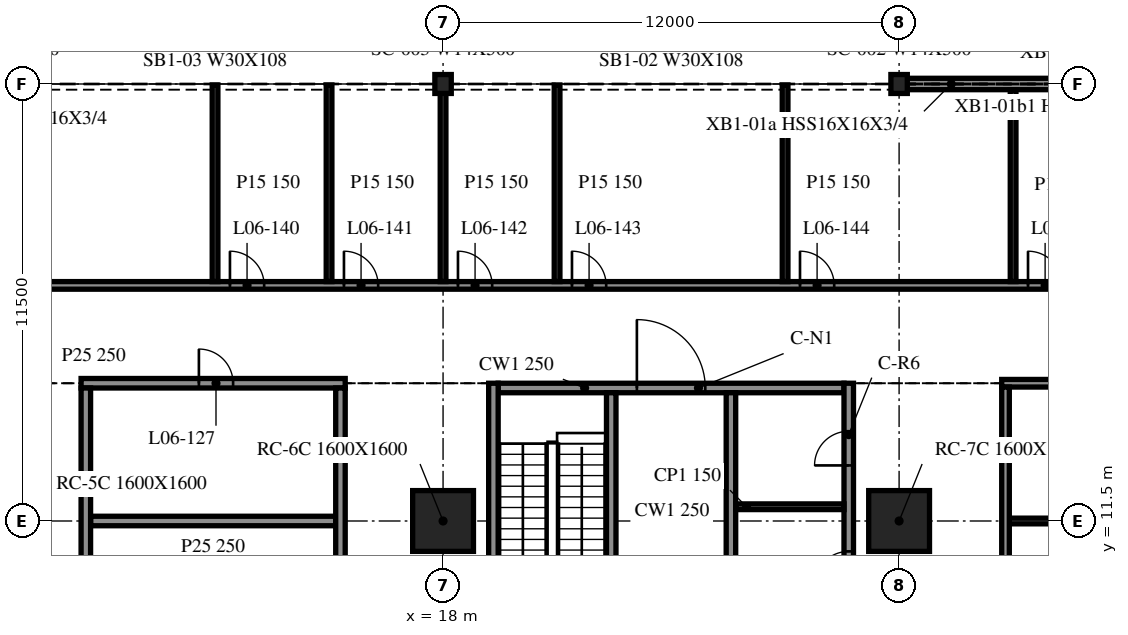
"""IFC4 building model, lengths in metres.
Left out: names, types, materials, properties, quantities, classifications, styles, units other than length and angle.
Written with IfcOpenShell. Run it as: python <this file> out.ifc"""

import sys

from ifc_helpers import new_model, si_unit, direction, frame, frame_2d, origin, origin_2d, place, context, subcontext, project, spatial, rectangle, i_section, extrude, element, fill, save


model = new_model("IFC4")
c1 = context("Model", 3, precision=1e-05, world=origin(), true_north=direction((0.0, 1.0)))
c2 = subcontext(c1, "Body", "Model", "MODEL_VIEW")
j1 = project(units=[si_unit("LENGTHUNIT", "METRE"), si_unit("PLANEANGLEUNIT", "RADIAN")], contexts=[c1])
p1 = place(None, origin())
s1 = spatial("IfcSite", under=j1, at=p1, CompositionType="ELEMENT")
p2 = place(p1, origin())
s2 = spatial("IfcBuilding", under=s1, at=p2, CompositionType="ELEMENT")
p3 = place(p2, frame((0.0, 0.0, 28.7)))
s3 = spatial("IfcBuildingStorey", under=s2, at=p3, CompositionType="ELEMENT", Elevation=28.7)
for number, where, z_axis, x_axis in (
    (1, (18.0, 11.5, -0.34), (0.0, 0.0, 1.0), (1.0, 0.0, 0.0)),
    (2, (30.0, 11.5, -0.34), (0.0, 0.0, 1.0), (1.0, 0.0, 0.0)),
):
    element("IfcColumn", number, at=place(p3, frame(where, z_axis=z_axis, x_axis=x_axis)), inside=s3, PredefinedType="COLUMN", context=c2, shape_type="SweptSolid", body=[
        extrude(rectangle(XDim=1.6, YDim=1.6, at=origin_2d()), origin(), (0.0, 0.0, 1.0), 4.3),
    ])
for number, where, z_axis, x_axis in (
    (3, (30.0, 23.0, -0.34), (0.0, 0.0, 1.0), (1.0, 0.0, 0.0)),
    (4, (18.0, 23.0, -0.34), (0.0, 0.0, 1.0), (1.0, 0.0, 0.0)),
):
    element("IfcColumn", number, at=place(p3, frame(where, z_axis=z_axis, x_axis=x_axis)), inside=s3, PredefinedType="COLUMN", context=c2, shape_type="SweptSolid", body=[
        extrude(i_section(OverallWidth=0.432, OverallDepth=0.498, WebThickness=0.056, FlangeThickness=0.089, at=origin_2d()), origin(), (0.0, 0.0, 1.0), 4.3),
    ])
p4 = place(p3, frame((41.972, 23.0, 0.0), z_axis=(0.0, 0.0, 1.0), x_axis=(-1.0, 0.0, 0.0)))
e5 = element("IfcWall", 5, at=p4, inside=s3, PredefinedType="NOTDEFINED", context=c2, shape_type="SweptSolid", body=[
    extrude(rectangle(XDim=11.944, YDim=0.3, at=frame_2d((5.972, 0.0))), origin(), (0.0, 0.0, 1.0), 3.203),
])
p5 = place(p3, frame((19.325, 15.125, 0.0), z_axis=(0.0, 0.0, 1.0), x_axis=(0.0, -1.0, 0.0)))
e6 = element("IfcWall", 6, at=p5, inside=s3, PredefinedType="SOLIDWALL", context=c2, shape_type="SweptSolid", body=[
    extrude(rectangle(XDim=24.25, YDim=0.25, at=frame_2d((12.125, 0.0))), origin(), (0.0, 0.0, 1.0), 3.96),
])
p6 = place(p3, frame((28.675, -9.125, 0.0), z_axis=(0.0, 0.0, 1.0), x_axis=(0.0, 1.0, 0.0)))
e7 = element("IfcWall", 7, at=p6, inside=s3, PredefinedType="SOLIDWALL", context=c2, shape_type="SweptSolid", body=[
    extrude(rectangle(XDim=24.25, YDim=0.25, at=frame_2d((12.125, 0.0))), origin(), (0.0, 0.0, 1.0), 3.96),
])
p7 = place(p6, frame((14.425, 0.0, 0.0)))
e8 = element("IfcOpeningElement", 8, at=p7, cuts=e7, PredefinedType="OPENING", context=c2, shape_type="SweptSolid", body=[
    extrude(rectangle(XDim=0.9, YDim=2.1, at=frame_2d((0.45, 1.05))), frame((0.0, 0.135, 0.0), z_axis=(0.0, -1.0, 0.0), x_axis=(1.0, 0.0, 0.0)), (0.0, 0.0, 1.0), 0.27),
])
p8 = place(p6, frame((18.925, 0.0, 0.0)))
e9 = element("IfcOpeningElement", 9, at=p8, cuts=e7, PredefinedType="OPENING", context=c2, shape_type="SweptSolid", body=[
    extrude(rectangle(XDim=0.9, YDim=2.1, at=frame_2d((0.45, 1.05))), frame((0.0, 0.135, 0.0), z_axis=(0.0, -1.0, 0.0), x_axis=(1.0, 0.0, 0.0)), (0.0, 0.0, 1.0), 0.27),
])
p9 = place(p6, frame((22.087, 0.0, 0.0)))
e10 = element("IfcOpeningElement", 10, at=p9, cuts=e7, PredefinedType="OPENING", context=c2, shape_type="SweptSolid", body=[
    extrude(rectangle(XDim=0.9, YDim=2.1, at=frame_2d((0.45, 1.05))), frame((0.0, 0.135, 0.0), z_axis=(0.0, -1.0, 0.0), x_axis=(1.0, 0.0, 0.0)), (0.0, 0.0, 1.0), 0.27),
])
p10 = place(p3, frame((19.45, 15.0, 0.0), z_axis=(0.0, 0.0, 1.0), x_axis=(1.0, 0.0, 0.0)))
e11 = element("IfcWall", 11, at=p10, inside=s3, PredefinedType="SOLIDWALL", context=c2, shape_type="SweptSolid", body=[
    extrude(rectangle(XDim=9.1, YDim=0.25, at=frame_2d((4.55, 0.0))), origin(), (0.0, 0.0, 1.0), 3.96),
])
p11 = place(p10, frame((3.65, 0.0, 0.0)))
e12 = element("IfcOpeningElement", 12, at=p11, cuts=e11, PredefinedType="OPENING", context=c2, shape_type="SweptSolid", body=[
    extrude(rectangle(XDim=1.8, YDim=2.1, at=frame_2d((0.9, 1.05))), frame((0.0, 0.135, 0.0), z_axis=(0.0, -1.0, 0.0), x_axis=(1.0, 0.0, 0.0)), (0.0, 0.0, 1.0), 0.27),
])
p12 = place(p3, frame((22.425, 14.875, 0.0), z_axis=(0.0, 0.0, 1.0), x_axis=(0.0, -1.0, 0.0)))
e13 = element("IfcWall", 13, at=p12, inside=s3, PredefinedType="SOLIDWALL", context=c2, shape_type="SweptSolid", body=[
    extrude(rectangle(XDim=6.25, YDim=0.25, at=frame_2d((3.125, 0.0))), origin(), (0.0, 0.0, 1.0), 3.96),
])
p13 = place(p12, frame((4.85, 0.0, 0.0)))
e14 = element("IfcOpeningElement", 14, at=p13, cuts=e13, PredefinedType="OPENING", context=c2, shape_type="SweptSolid", body=[
    extrude(rectangle(XDim=1.0, YDim=2.1, at=frame_2d((0.5, 1.05))), frame((0.0, 0.135, 0.0), z_axis=(0.0, -1.0, 0.0), x_axis=(1.0, 0.0, 0.0)), (0.0, 0.0, 1.0), 0.27),
])
p14 = place(p3, frame((25.575, 14.875, 0.0), z_axis=(0.0, 0.0, 1.0), x_axis=(0.0, -1.0, 0.0)))
e15 = element("IfcWall", 15, at=p14, inside=s3, PredefinedType="SOLIDWALL", context=c2, shape_type="SweptSolid", body=[
    extrude(rectangle(XDim=17.5, YDim=0.25, at=frame_2d((8.75, 0.0))), origin(), (0.0, 0.0, 1.0), 3.96),
])
p15 = place(p14, frame((15.45, 0.0, 0.0)))
e16 = element("IfcOpeningElement", 16, at=p15, cuts=e15, PredefinedType="OPENING", context=c2, shape_type="SweptSolid", body=[
    extrude(rectangle(XDim=1.1, YDim=2.1, at=frame_2d((0.55, 1.05))), frame((0.0, 0.135, 0.0), z_axis=(0.0, -1.0, 0.0), x_axis=(1.0, 0.0, 0.0)), (0.0, 0.0, 1.0), 0.27),
])
p16 = place(p14, frame((12.8, 0.0, 0.0)))
e17 = element("IfcOpeningElement", 17, at=p16, cuts=e15, PredefinedType="OPENING", context=c2, shape_type="SweptSolid", body=[
    extrude(rectangle(XDim=0.9, YDim=2.1, at=frame_2d((0.45, 1.05))), frame((0.0, 0.135, 0.0), z_axis=(0.0, -1.0, 0.0), x_axis=(1.0, 0.0, 0.0)), (0.0, 0.0, 1.0), 0.27),
])
p17 = place(p3, frame((25.7, 11.875, 0.0), z_axis=(0.0, 0.0, 1.0), x_axis=(1.0, 0.0, 0.0)))
e18 = element("IfcWall", 18, at=p17, inside=s3, PredefinedType="PARTITIONING", context=c2, shape_type="SweptSolid", body=[
    extrude(rectangle(XDim=2.85, YDim=0.15, at=frame_2d((1.425, 0.0))), origin(), (0.0, 0.0, 1.0), 3.96),
])
p18 = place(p3, frame((8.725, 11.5, 0.0), z_axis=(0.0, 0.0, 1.0), x_axis=(1.0, 0.0, 0.0)))
e19 = element("IfcWall", 19, at=p18, inside=s3, PredefinedType="PARTITIONING", context=c2, shape_type="SweptSolid", body=[
    extrude(rectangle(XDim=6.45, YDim=0.25, at=frame_2d((3.225, 0.0))), origin(), (0.0, 0.0, 1.0), 3.96),
])
p19 = place(p3, frame((32.9, 11.5, 0.0), z_axis=(0.0, 0.0, 1.0), x_axis=(1.0, 0.0, 0.0)))
e20 = element("IfcWall", 20, at=p19, inside=s3, PredefinedType="PARTITIONING", context=c2, shape_type="SweptSolid", body=[
    extrude(rectangle(XDim=8.3, YDim=0.15, at=frame_2d((4.15, 0.0))), origin(), (0.0, 0.0, 1.0), 3.96),
])
p20 = place(p3, frame((8.475, 15.125, 0.0), z_axis=(0.0, 0.0, 1.0), x_axis=(1.0, 0.0, 0.0)))
e21 = element("IfcWall", 21, at=p20, inside=s3, PredefinedType="PARTITIONING", context=c2, shape_type="SweptSolid", body=[
    extrude(rectangle(XDim=6.95, YDim=0.25, at=frame_2d((3.475, 0.0))), origin(), (0.0, 0.0, 1.0), 3.96),
])
p21 = place(p20, frame((3.1, 0.0, 0.0)))
e22 = element("IfcOpeningElement", 22, at=p21, cuts=e21, PredefinedType="OPENING", context=c2, shape_type="SweptSolid", body=[
    extrude(rectangle(XDim=0.9, YDim=2.1, at=frame_2d((0.45, 1.05))), frame((0.0, 0.135, 0.0), z_axis=(0.0, -1.0, 0.0), x_axis=(1.0, 0.0, 0.0)), (0.0, 0.0, 1.0), 0.27),
])
p22 = place(p3, frame((32.7, 15.125, 0.0), z_axis=(0.0, 0.0, 1.0), x_axis=(1.0, 0.0, 0.0)))
e23 = element("IfcWall", 23, at=p22, inside=s3, PredefinedType="PARTITIONING", context=c2, shape_type="SweptSolid", body=[
    extrude(rectangle(XDim=15.15, YDim=0.2, at=frame_2d((7.575, 0.0))), origin(), (0.0, 0.0, 1.0), 3.96),
])
p23 = place(p22, frame((7.1, 0.0, 0.0)))
e24 = element("IfcOpeningElement", 24, at=p23, cuts=e23, PredefinedType="OPENING", context=c2, shape_type="SweptSolid", body=[
    extrude(rectangle(XDim=1.0, YDim=2.1, at=frame_2d((0.5, 1.05))), frame((0.0, 0.11, 0.0), z_axis=(0.0, -1.0, 0.0), x_axis=(1.0, 0.0, 0.0)), (0.0, 0.0, 1.0), 0.22),
])
p24 = place(p3, frame((-47.708, 17.7, 0.0), z_axis=(0.0, 0.0, 1.0), x_axis=(1.0, 0.0, 0.0)))
e25 = element("IfcWall", 25, at=p24, inside=s3, PredefinedType="PARTITIONING", context=c2, shape_type="SweptSolid", body=[
    extrude(rectangle(XDim=95.416, YDim=0.2, at=frame_2d((47.708, 0.0))), origin(), (0.0, 0.0, 1.0), 3.96),
])
p25 = place(p24, frame((4.5, 0.0, 0.0)))
e26 = element("IfcOpeningElement", 26, at=p25, cuts=e25, PredefinedType="OPENING", context=c2, shape_type="SweptSolid", body=[
    extrude(rectangle(XDim=0.9, YDim=2.1, at=frame_2d((0.45, 1.05))), frame((0.0, 0.11, 0.0), z_axis=(0.0, -1.0, 0.0), x_axis=(1.0, 0.0, 0.0)), (0.0, 0.0, 1.0), 0.22),
])
p26 = place(p24, frame((7.5, 0.0, 0.0)))
e27 = element("IfcOpeningElement", 27, at=p26, cuts=e25, PredefinedType="OPENING", context=c2, shape_type="SweptSolid", body=[
    extrude(rectangle(XDim=0.9, YDim=2.1, at=frame_2d((0.45, 1.05))), frame((0.0, 0.11, 0.0), z_axis=(0.0, -1.0, 0.0), x_axis=(1.0, 0.0, 0.0)), (0.0, 0.0, 1.0), 0.22),
])
p27 = place(p24, frame((13.5, 0.0, 0.0)))
e28 = element("IfcOpeningElement", 28, at=p27, cuts=e25, PredefinedType="OPENING", context=c2, shape_type="SweptSolid", body=[
    extrude(rectangle(XDim=0.9, YDim=2.1, at=frame_2d((0.45, 1.05))), frame((0.0, 0.11, 0.0), z_axis=(0.0, -1.0, 0.0), x_axis=(1.0, 0.0, 0.0)), (0.0, 0.0, 1.0), 0.22),
])
p28 = place(p24, frame((19.5, 0.0, 0.0)))
e29 = element("IfcOpeningElement", 29, at=p28, cuts=e25, PredefinedType="OPENING", context=c2, shape_type="SweptSolid", body=[
    extrude(rectangle(XDim=0.9, YDim=2.1, at=frame_2d((0.45, 1.05))), frame((0.0, 0.11, 0.0), z_axis=(0.0, -1.0, 0.0), x_axis=(1.0, 0.0, 0.0)), (0.0, 0.0, 1.0), 0.22),
])
p29 = place(p24, frame((28.5, 0.0, 0.0)))
e30 = element("IfcOpeningElement", 30, at=p29, cuts=e25, PredefinedType="OPENING", context=c2, shape_type="SweptSolid", body=[
    extrude(rectangle(XDim=0.9, YDim=2.1, at=frame_2d((0.45, 1.05))), frame((0.0, 0.11, 0.0), z_axis=(0.0, -1.0, 0.0), x_axis=(1.0, 0.0, 0.0)), (0.0, 0.0, 1.0), 0.22),
])
p30 = place(p24, frame((31.5, 0.0, 0.0)))
e31 = element("IfcOpeningElement", 31, at=p30, cuts=e25, PredefinedType="OPENING", context=c2, shape_type="SweptSolid", body=[
    extrude(rectangle(XDim=0.9, YDim=2.1, at=frame_2d((0.45, 1.05))), frame((0.0, 0.11, 0.0), z_axis=(0.0, -1.0, 0.0), x_axis=(1.0, 0.0, 0.0)), (0.0, 0.0, 1.0), 0.22),
])
p31 = place(p24, frame((34.5, 0.0, 0.0)))
e32 = element("IfcOpeningElement", 32, at=p31, cuts=e25, PredefinedType="OPENING", context=c2, shape_type="SweptSolid", body=[
    extrude(rectangle(XDim=0.9, YDim=2.1, at=frame_2d((0.45, 1.05))), frame((0.0, 0.11, 0.0), z_axis=(0.0, -1.0, 0.0), x_axis=(1.0, 0.0, 0.0)), (0.0, 0.0, 1.0), 0.22),
])
p32 = place(p24, frame((37.5, 0.0, 0.0)))
e33 = element("IfcOpeningElement", 33, at=p32, cuts=e25, PredefinedType="OPENING", context=c2, shape_type="SweptSolid", body=[
    extrude(rectangle(XDim=0.9, YDim=2.1, at=frame_2d((0.45, 1.05))), frame((0.0, 0.11, 0.0), z_axis=(0.0, -1.0, 0.0), x_axis=(1.0, 0.0, 0.0)), (0.0, 0.0, 1.0), 0.22),
])
p33 = place(p24, frame((43.5, 0.0, 0.0)))
e34 = element("IfcOpeningElement", 34, at=p33, cuts=e25, PredefinedType="OPENING", context=c2, shape_type="SweptSolid", body=[
    extrude(rectangle(XDim=0.9, YDim=2.1, at=frame_2d((0.45, 1.05))), frame((0.0, 0.11, 0.0), z_axis=(0.0, -1.0, 0.0), x_axis=(1.0, 0.0, 0.0)), (0.0, 0.0, 1.0), 0.22),
])
p34 = place(p24, frame((47.3, 0.0, 0.0)))
e35 = element("IfcOpeningElement", 35, at=p34, cuts=e25, PredefinedType="OPENING", context=c2, shape_type="SweptSolid", body=[
    extrude(rectangle(XDim=0.9, YDim=2.1, at=frame_2d((0.45, 1.05))), frame((0.0, 0.11, 0.0), z_axis=(0.0, -1.0, 0.0), x_axis=(1.0, 0.0, 0.0)), (0.0, 0.0, 1.0), 0.22),
])
p35 = place(p24, frame((51.1, 0.0, 0.0)))
e36 = element("IfcOpeningElement", 36, at=p35, cuts=e25, PredefinedType="OPENING", context=c2, shape_type="SweptSolid", body=[
    extrude(rectangle(XDim=0.9, YDim=2.1, at=frame_2d((0.45, 1.05))), frame((0.0, 0.11, 0.0), z_axis=(0.0, -1.0, 0.0), x_axis=(1.0, 0.0, 0.0)), (0.0, 0.0, 1.0), 0.22),
])
p36 = place(p24, frame((60.1, 0.0, 0.0)))
e37 = element("IfcOpeningElement", 37, at=p36, cuts=e25, PredefinedType="OPENING", context=c2, shape_type="SweptSolid", body=[
    extrude(rectangle(XDim=0.9, YDim=2.1, at=frame_2d((0.45, 1.05))), frame((0.0, 0.11, 0.0), z_axis=(0.0, -1.0, 0.0), x_axis=(1.0, 0.0, 0.0)), (0.0, 0.0, 1.0), 0.22),
])
p37 = place(p24, frame((63.1, 0.0, 0.0)))
e38 = element("IfcOpeningElement", 38, at=p37, cuts=e25, PredefinedType="OPENING", context=c2, shape_type="SweptSolid", body=[
    extrude(rectangle(XDim=0.9, YDim=2.1, at=frame_2d((0.45, 1.05))), frame((0.0, 0.11, 0.0), z_axis=(0.0, -1.0, 0.0), x_axis=(1.0, 0.0, 0.0)), (0.0, 0.0, 1.0), 0.22),
])
p38 = place(p24, frame((66.1, 0.0, 0.0)))
e39 = element("IfcOpeningElement", 39, at=p38, cuts=e25, PredefinedType="OPENING", context=c2, shape_type="SweptSolid", body=[
    extrude(rectangle(XDim=0.9, YDim=2.1, at=frame_2d((0.45, 1.05))), frame((0.0, 0.11, 0.0), z_axis=(0.0, -1.0, 0.0), x_axis=(1.0, 0.0, 0.0)), (0.0, 0.0, 1.0), 0.22),
])
p39 = place(p24, frame((69.1, 0.0, 0.0)))
e40 = element("IfcOpeningElement", 40, at=p39, cuts=e25, PredefinedType="OPENING", context=c2, shape_type="SweptSolid", body=[
    extrude(rectangle(XDim=0.9, YDim=2.1, at=frame_2d((0.45, 1.05))), frame((0.0, 0.11, 0.0), z_axis=(0.0, -1.0, 0.0), x_axis=(1.0, 0.0, 0.0)), (0.0, 0.0, 1.0), 0.22),
])
p40 = place(p24, frame((75.1, 0.0, 0.0)))
e41 = element("IfcOpeningElement", 41, at=p40, cuts=e25, PredefinedType="OPENING", context=c2, shape_type="SweptSolid", body=[
    extrude(rectangle(XDim=0.9, YDim=2.1, at=frame_2d((0.45, 1.05))), frame((0.0, 0.11, 0.0), z_axis=(0.0, -1.0, 0.0), x_axis=(1.0, 0.0, 0.0)), (0.0, 0.0, 1.0), 0.22),
])
p41 = place(p24, frame((81.1, 0.0, 0.0)))
e42 = element("IfcOpeningElement", 42, at=p41, cuts=e25, PredefinedType="OPENING", context=c2, shape_type="SweptSolid", body=[
    extrude(rectangle(XDim=0.9, YDim=2.1, at=frame_2d((0.45, 1.05))), frame((0.0, 0.11, 0.0), z_axis=(0.0, -1.0, 0.0), x_axis=(1.0, 0.0, 0.0)), (0.0, 0.0, 1.0), 0.22),
])
p42 = place(p24, frame((90.1, 0.0, 0.0)))
e43 = element("IfcOpeningElement", 43, at=p42, cuts=e25, PredefinedType="OPENING", context=c2, shape_type="SweptSolid", body=[
    extrude(rectangle(XDim=0.9, YDim=2.1, at=frame_2d((0.45, 1.05))), frame((0.0, 0.11, 0.0), z_axis=(0.0, -1.0, 0.0), x_axis=(1.0, 0.0, 0.0)), (0.0, 0.0, 1.0), 0.22),
])
p43 = place(p3, frame((8.6, -9.0, 0.0), z_axis=(0.0, 0.0, 1.0), x_axis=(0.0, 1.0, 0.0)))
e44 = element("IfcWall", 44, at=p43, inside=s3, PredefinedType="PARTITIONING", context=c2, shape_type="SweptSolid", body=[
    extrude(rectangle(XDim=24.0, YDim=0.25, at=frame_2d((12.0, 0.0))), origin(), (0.0, 0.0, 1.0), 3.96),
])
p44 = place(p43, frame((12.3, 0.0, 0.0)))
e45 = element("IfcOpeningElement", 45, at=p44, cuts=e44, PredefinedType="OPENING", context=c2, shape_type="SweptSolid", body=[
    extrude(rectangle(XDim=0.9, YDim=2.1, at=frame_2d((0.45, 1.05))), frame((0.0, 0.135, 0.0), z_axis=(0.0, -1.0, 0.0), x_axis=(1.0, 0.0, 0.0)), (0.0, 0.0, 1.0), 0.27),
])
for number, where, z_axis, x_axis in (
    (46, (12.0, 17.8, 0.0), (0.0, 0.0, 1.0), (0.0, 1.0, 0.0)),
    (47, (15.0, 17.8, 0.0), (0.0, 0.0, 1.0), (0.0, 1.0, 0.0)),
):
    element("IfcWall", number, at=place(p3, frame(where, z_axis=z_axis, x_axis=x_axis)), inside=s3, PredefinedType="PARTITIONING", context=c2, shape_type="SweptSolid", body=[
        extrude(rectangle(XDim=5.175, YDim=0.15, at=frame_2d((2.587, 0.0))), origin(), (0.0, 0.0, 1.0), 3.96),
    ])
p45 = place(p3, frame((15.3, -9.0, 0.0), z_axis=(0.0, 0.0, 1.0), x_axis=(0.0, 1.0, 0.0)))
e48 = element("IfcWall", 48, at=p45, inside=s3, PredefinedType="PARTITIONING", context=c2, shape_type="SweptSolid", body=[
    extrude(rectangle(XDim=24.0, YDim=0.25, at=frame_2d((12.0, 0.0))), origin(), (0.0, 0.0, 1.0), 3.96),
])
for number, where, z_axis, x_axis in (
    (49, (18.0, 17.8, 0.0), (0.0, 0.0, 1.0), (0.0, 1.0, 0.0)),
    (50, (21.0, 17.8, 0.0), (0.0, 0.0, 1.0), (0.0, 1.0, 0.0)),
    (51, (27.0, 17.8, 0.0), (0.0, 0.0, 1.0), (0.0, 1.0, 0.0)),
):
    element("IfcWall", number, at=place(p3, frame(where, z_axis=z_axis, x_axis=x_axis)), inside=s3, PredefinedType="PARTITIONING", context=c2, shape_type="SweptSolid", body=[
        extrude(rectangle(XDim=5.175, YDim=0.15, at=frame_2d((2.587, 0.0))), origin(), (0.0, 0.0, 1.0), 3.96),
    ])
p46 = place(p3, frame((32.8, -9.025, 0.0), z_axis=(0.0, 0.0, 1.0), x_axis=(0.0, 1.0, 0.0)))
e52 = element("IfcWall", 52, at=p46, inside=s3, PredefinedType="PARTITIONING", context=c2, shape_type="SweptSolid", body=[
    extrude(rectangle(XDim=24.05, YDim=0.2, at=frame_2d((12.025, 0.0))), origin(), (0.0, 0.0, 1.0), 3.96),
])
p47 = place(p3, frame((33.0, 17.8, 0.0), z_axis=(0.0, 0.0, 1.0), x_axis=(0.0, 1.0, 0.0)))
e53 = element("IfcWall", 53, at=p47, inside=s3, PredefinedType="PARTITIONING", context=c2, shape_type="SweptSolid", body=[
    extrude(rectangle(XDim=5.05, YDim=0.15, at=frame_2d((2.525, 0.0))), origin(), (0.0, 0.0, 1.0), 3.96),
])
p48 = place(p11, origin())
e54 = element("IfcDoor", 54, at=p48, inside=s3, OperationType="DOUBLE_DOOR_SINGLE_SWING", PredefinedType="DOOR", context=c2, shape_type="SweptSolid", body=[
    extrude(rectangle(XDim=1.8, YDim=2.1, at=frame_2d((0.9, 1.05))), frame((0.0, 0.025, 0.0), z_axis=(0.0, -1.0, 0.0), x_axis=(1.0, 0.0, 0.0)), (0.0, 0.0, 1.0), 0.05),
])
fill(e12, e54)
p49 = place(p8, origin())
e55 = element("IfcDoor", 55, at=p49, inside=s3, OperationType="SINGLE_SWING_LEFT", PredefinedType="DOOR", context=c2, shape_type="SweptSolid", body=[
    extrude(rectangle(XDim=0.9, YDim=2.1, at=frame_2d((0.45, 1.05))), frame((0.0, 0.025, 0.0), z_axis=(0.0, -1.0, 0.0), x_axis=(1.0, 0.0, 0.0)), (0.0, 0.0, 1.0), 0.05),
])
fill(e9, e55)
p50 = place(p9, origin())
e56 = element("IfcDoor", 56, at=p50, inside=s3, OperationType="SINGLE_SWING_RIGHT", PredefinedType="DOOR", context=c2, shape_type="SweptSolid", body=[
    extrude(rectangle(XDim=0.9, YDim=2.1, at=frame_2d((0.45, 1.05))), frame((0.0, 0.025, 0.0), z_axis=(0.0, -1.0, 0.0), x_axis=(1.0, 0.0, 0.0)), (0.0, 0.0, 1.0), 0.05),
])
fill(e10, e56)
p51 = place(p21, origin())
e57 = element("IfcDoor", 57, at=p51, inside=s3, OperationType="SINGLE_SWING_LEFT", PredefinedType="DOOR", context=c2, shape_type="SweptSolid", body=[
    extrude(rectangle(XDim=0.9, YDim=2.1, at=frame_2d((0.45, 1.05))), frame((0.0, 0.025, 0.0), z_axis=(0.0, -1.0, 0.0), x_axis=(1.0, 0.0, 0.0)), (0.0, 0.0, 1.0), 0.05),
])
fill(e22, e57)
p52 = place(p36, origin())
e58 = element("IfcDoor", 58, at=p52, inside=s3, OperationType="SINGLE_SWING_RIGHT", PredefinedType="DOOR", context=c2, shape_type="SweptSolid", body=[
    extrude(rectangle(XDim=0.9, YDim=2.1, at=frame_2d((0.45, 1.05))), frame((0.0, 0.025, 0.0), z_axis=(0.0, -1.0, 0.0), x_axis=(1.0, 0.0, 0.0)), (0.0, 0.0, 1.0), 0.05),
])
fill(e37, e58)
p53 = place(p37, origin())
e59 = element("IfcDoor", 59, at=p53, inside=s3, OperationType="SINGLE_SWING_RIGHT", PredefinedType="DOOR", context=c2, shape_type="SweptSolid", body=[
    extrude(rectangle(XDim=0.9, YDim=2.1, at=frame_2d((0.45, 1.05))), frame((0.0, 0.025, 0.0), z_axis=(0.0, -1.0, 0.0), x_axis=(1.0, 0.0, 0.0)), (0.0, 0.0, 1.0), 0.05),
])
fill(e38, e59)
p54 = place(p38, origin())
e60 = element("IfcDoor", 60, at=p54, inside=s3, OperationType="SINGLE_SWING_RIGHT", PredefinedType="DOOR", context=c2, shape_type="SweptSolid", body=[
    extrude(rectangle(XDim=0.9, YDim=2.1, at=frame_2d((0.45, 1.05))), frame((0.0, 0.025, 0.0), z_axis=(0.0, -1.0, 0.0), x_axis=(1.0, 0.0, 0.0)), (0.0, 0.0, 1.0), 0.05),
])
fill(e39, e60)
p55 = place(p39, origin())
e61 = element("IfcDoor", 61, at=p55, inside=s3, OperationType="SINGLE_SWING_RIGHT", PredefinedType="DOOR", context=c2, shape_type="SweptSolid", body=[
    extrude(rectangle(XDim=0.9, YDim=2.1, at=frame_2d((0.45, 1.05))), frame((0.0, 0.025, 0.0), z_axis=(0.0, -1.0, 0.0), x_axis=(1.0, 0.0, 0.0)), (0.0, 0.0, 1.0), 0.05),
])
fill(e40, e61)
p56 = place(p40, origin())
e62 = element("IfcDoor", 62, at=p56, inside=s3, OperationType="SINGLE_SWING_RIGHT", PredefinedType="DOOR", context=c2, shape_type="SweptSolid", body=[
    extrude(rectangle(XDim=0.9, YDim=2.1, at=frame_2d((0.45, 1.05))), frame((0.0, 0.025, 0.0), z_axis=(0.0, -1.0, 0.0), x_axis=(1.0, 0.0, 0.0)), (0.0, 0.0, 1.0), 0.05),
])
fill(e41, e62)
p57 = place(p41, origin())
e63 = element("IfcDoor", 63, at=p57, inside=s3, OperationType="SINGLE_SWING_RIGHT", PredefinedType="DOOR", context=c2, shape_type="SweptSolid", body=[
    extrude(rectangle(XDim=0.9, YDim=2.1, at=frame_2d((0.45, 1.05))), frame((0.0, 0.025, 0.0), z_axis=(0.0, -1.0, 0.0), x_axis=(1.0, 0.0, 0.0)), (0.0, 0.0, 1.0), 0.05),
])
fill(e42, e63)
save(model, sys.argv[1])
